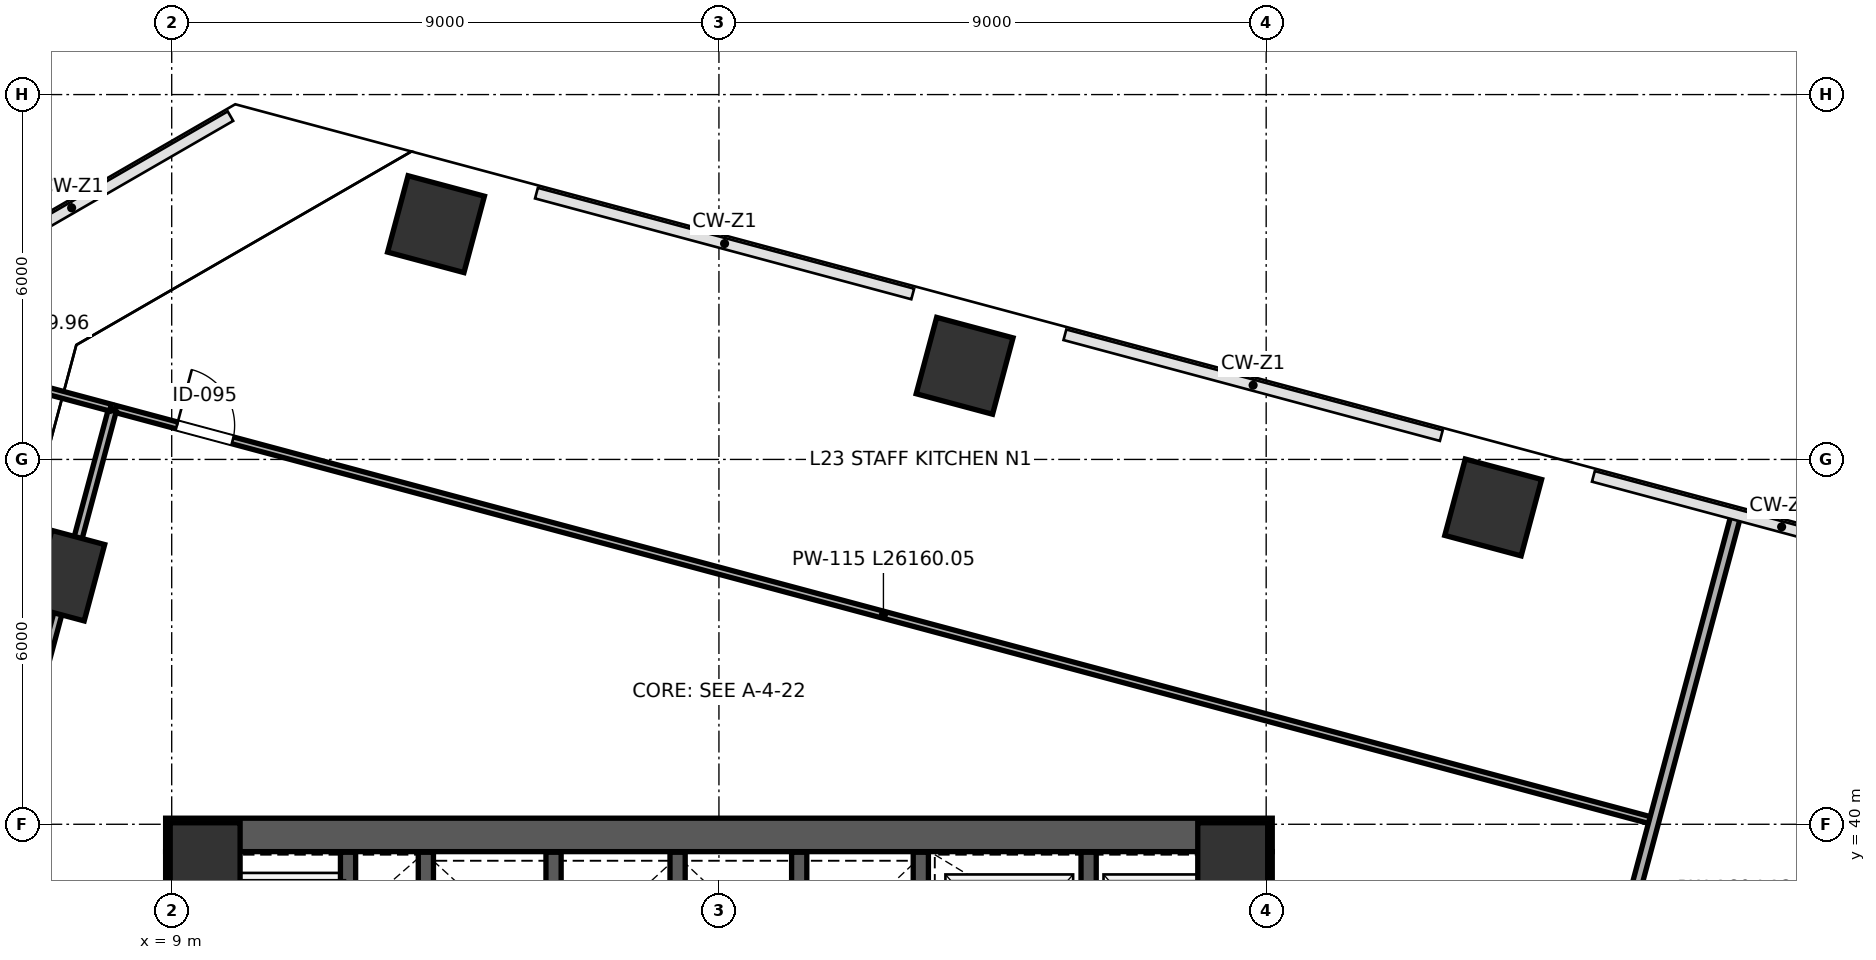
"""IFC4 building model, lengths in metres.
Left out: names, types, materials, properties, quantities, classifications, styles, units other than length and angle.
Written with IfcOpenShell. Run it as: python <this file> out.ifc"""

import sys

from ifc_helpers import new_model, si_unit, direction, frame, frame_2d, origin, origin_2d, place, context, subcontext, project, spatial, rectangle, extrude, clip, halfspace, source, transform, mapped, element, fill, save


model = new_model("IFC4")
c1 = context("Model", 3, precision=1e-05, world=origin(), true_north=direction((0.0, 1.0)))
c2 = subcontext(c1, "Body", "Model", "MODEL_VIEW")
j1 = project(units=[si_unit("LENGTHUNIT", "METRE"), si_unit("PLANEANGLEUNIT", "RADIAN")], contexts=[c1])
p1 = place(None, origin())
s1 = spatial("IfcSite", under=j1, at=p1, CompositionType="ELEMENT")
p2 = place(p1, origin())
s2 = spatial("IfcBuilding", under=s1, at=p2, CompositionType="ELEMENT")
p3 = place(p2, frame((0.0, 0.0, 104.2)))
s3 = spatial("IfcBuildingStorey", under=s2, at=p3, CompositionType="ELEMENT", Elevation=104.2)
m1 = source(origin(), c2, "Body", "SweptSolid", [
    extrude(rectangle(XDim=1.15, YDim=1.15, at=origin_2d()), origin(), (0.0, 0.0, 1.0), 4.198),
])
for number, where, z_axis, x_axis in (
    (1, (9.55, 39.45, 0.001), (0.0, 0.0, 1.0), (1.0, 0.0, 0.0)),
    (2, (26.45, 39.45, 0.001), (0.0, 0.0, 1.0), (1.0, 0.0, 0.0)),
):
    element("IfcColumn", number, at=place(p3, frame(where, z_axis=z_axis, x_axis=x_axis)), inside=s3, PredefinedType="COLUMN", context=c2, shape_type="MappedRepresentation", body=[
        mapped(m1, transform((0.0, 0.0, 0.0), scale=1.0)),
    ])
p4 = place(p3, frame((13.347, 49.869, 0.0), z_axis=(0.092815704431, 0.041116489627, 0.994833995846), x_axis=(0.155810351759, -0.987437496095, 0.026274047849)))
e3 = element("IfcColumn", 3, at=p4, inside=s3, PredefinedType="COLUMN", context=c2, shape_type="Clipping", body=[
    clip(clip(extrude(rectangle(XDim=1.3, YDim=1.3, at=origin_2d()), origin(), (0.0, 0.0, 1.0), 4.222), halfspace(frame((0.0, 0.0, 0.082), z_axis=(0.0, 0.0, -1.0), x_axis=(1.0, 0.0, 0.0)), False)), halfspace(frame((0.0, 0.0, 4.14), z_axis=(0.0, 0.0, 1.0), x_axis=(1.0, 0.0, 0.0)), False)),
])
p5 = place(p3, frame((22.04, 47.54, 0.0), z_axis=(0.080421722381, -0.003650265497, 0.996754243598), x_axis=(-0.301511014644, -0.953234999804, 0.020836103199)))
e4 = element("IfcColumn", 4, at=p5, inside=s3, PredefinedType="COLUMN", context=c2, shape_type="Clipping", body=[
    clip(clip(extrude(rectangle(XDim=1.3, YDim=1.3, at=origin_2d()), origin(), (0.0, 0.0, 1.0), 4.214), halfspace(frame((0.0, 0.0, 0.065), z_axis=(0.0, 0.0, -1.0), x_axis=(1.0, 0.0, 0.0)), False)), halfspace(frame((0.0, 0.0, 4.149), z_axis=(0.0, 0.0, 1.0), x_axis=(1.0, 0.0, 0.0)), False)),
])
p6 = place(p3, frame((30.734, 45.21, 0.0), z_axis=(0.067889968656, -0.048542486121, 0.996511203749), x_axis=(-0.771615774853, -0.635722031456, 0.021600803684)))
e5 = element("IfcColumn", 5, at=p6, inside=s3, PredefinedType="COLUMN", context=c2, shape_type="Clipping", body=[
    clip(clip(extrude(rectangle(XDim=1.3, YDim=1.3, at=origin_2d()), origin(), (0.0, 0.0, 1.0), 4.215), halfspace(frame((0.0, 0.0, 0.067), z_axis=(0.0, 0.0, -1.0), x_axis=(1.0, 0.0, 0.0)), False)), halfspace(frame((0.0, 0.0, 4.147), z_axis=(0.0, 0.0, 1.0), x_axis=(1.0, 0.0, 0.0)), False)),
])
p7 = place(p3, frame((7.295, 44.088, 0.0), z_axis=(0.063297021614, 0.072785789023, 0.995336986136), x_axis=(0.559820742609, -0.828237566944, 0.02496535295)))
e6 = element("IfcColumn", 6, at=p7, inside=s3, PredefinedType="PILASTER", context=c2, shape_type="Clipping", body=[
    clip(clip(extrude(rectangle(XDim=0.9, YDim=1.3, at=origin_2d()), origin(), (0.0, 0.0, 1.0), 4.22), halfspace(frame((0.0, 0.0, 0.073), z_axis=(0.0, 0.0, -1.0), x_axis=(1.0, 0.0, 0.0)), False)), halfspace(frame((0.0, 0.0, 4.147), z_axis=(0.0, 0.0, 1.0), x_axis=(1.0, 0.0, 0.0)), False)),
])
p8 = place(p3, frame((9.175, 24.45, 0.0), z_axis=(0.0, 0.0, 1.0), x_axis=(0.0, 1.0, 0.0)))
e7 = element("IfcWall", 7, at=p8, inside=s3, PredefinedType="SHEAR", context=c2, shape_type="SweptSolid", body=[
    extrude(rectangle(XDim=15.1, YDim=0.55, at=frame_2d((7.55, 0.0))), origin(), (0.0, 0.0, 1.0), 3.96),
])
p9 = place(p3, frame((26.825, 24.45, 0.0), z_axis=(0.0, 0.0, 1.0), x_axis=(0.0, 1.0, 0.0)))
e8 = element("IfcWall", 8, at=p9, inside=s3, PredefinedType="SHEAR", context=c2, shape_type="SweptSolid", body=[
    extrude(rectangle(XDim=15.1, YDim=0.55, at=frame_2d((7.55, 0.0))), origin(), (0.0, 0.0, 1.0), 3.96),
])
p10 = place(p9, frame((8.6, 0.0, 0.0)))
e9 = element("IfcOpeningElement", 9, at=p10, cuts=e8, PredefinedType="OPENING", context=c2, shape_type="SweptSolid", body=[
    extrude(rectangle(XDim=1.15, YDim=2.2, at=frame_2d((0.575, 1.1))), frame((0.0, 0.285, 0.0), z_axis=(0.0, -1.0, 0.0), x_axis=(1.0, 0.0, 0.0)), (0.0, 0.0, 1.0), 0.57),
])
p11 = place(p3, frame((8.9, 39.825, 0.0), z_axis=(0.0, 0.0, 1.0), x_axis=(1.0, 0.0, 0.0)))
e10 = element("IfcWall", 10, at=p11, inside=s3, PredefinedType="SHEAR", context=c2, shape_type="SweptSolid", body=[
    extrude(rectangle(XDim=18.2, YDim=0.55, at=frame_2d((9.1, 0.0))), origin(), (0.0, 0.0, 1.0), 3.96),
])
p12 = place(p3, frame((21.32, 32.12, 0.0), z_axis=(0.0, 0.0, 1.0), x_axis=(0.0, 1.0, 0.0)))
e11 = element("IfcWall", 11, at=p12, inside=s3, PredefinedType="SHEAR", context=c2, shape_type="SweptSolid", body=[
    extrude(rectangle(XDim=7.42, YDim=0.25, at=frame_2d((3.71, 0.0))), origin(), (0.0, 0.0, 1.0), 3.96),
])
p13 = place(p12, frame((1.4, 0.0, 0.0)))
e12 = element("IfcOpeningElement", 12, at=p13, cuts=e11, PredefinedType="OPENING", context=c2, shape_type="SweptSolid", body=[
    extrude(rectangle(XDim=1.15, YDim=2.2, at=frame_2d((0.575, 1.1))), frame((0.0, 0.135, 0.0), z_axis=(0.0, -1.0, 0.0), x_axis=(1.0, 0.0, 0.0)), (0.0, 0.0, 1.0), 0.27),
])
p14 = place(p3, frame((11.9, 36.31, 0.0), z_axis=(0.0, 0.0, 1.0), x_axis=(0.0, 1.0, 0.0)))
e13 = element("IfcWall", 13, at=p14, inside=s3, PredefinedType="SHEAR", context=c2, shape_type="SweptSolid", body=[
    extrude(rectangle(XDim=3.23, YDim=0.25, at=frame_2d((1.615, 0.0))), origin(), (0.0, 0.0, 1.0), 3.96),
])
p15 = place(p3, frame((24.08, 36.48, 0.0), z_axis=(0.0, 0.0, 1.0), x_axis=(0.0, 1.0, 0.0)))
e14 = element("IfcWall", 14, at=p15, inside=s3, PredefinedType="SHEAR", context=c2, shape_type="SweptSolid", body=[
    extrude(rectangle(XDim=3.06, YDim=0.25, at=frame_2d((1.53, 0.0))), origin(), (0.0, 0.0, 1.0), 3.96),
])
for number, where, z_axis, x_axis in (
    (15, (13.18, 35.81, 0.0), (0.0, 0.0, 1.0), (0.0, 1.0, 0.0)),
    (16, (15.28, 35.81, 0.0), (0.0, 0.0, 1.0), (0.0, 1.0, 0.0)),
    (17, (17.32, 35.81, 0.0), (0.0, 0.0, 1.0), (0.0, 1.0, 0.0)),
    (18, (19.32, 35.81, 0.0), (0.0, 0.0, 1.0), (0.0, 1.0, 0.0)),
):
    element("IfcWall", number, at=place(p3, frame(where, z_axis=z_axis, x_axis=x_axis)), inside=s3, PredefinedType="SHEAR", context=c2, shape_type="SweptSolid", body=[
        extrude(rectangle(XDim=3.73, YDim=0.25, at=frame_2d((1.865, 0.0))), origin(), (0.0, 0.0, 1.0), 3.96),
    ])
p16 = place(p3, frame((8.071, 46.831, 0.0), z_axis=(0.0, 0.0, 1.0), x_axis=(0.965925848141, -0.258818963551, 0.0)))
e19 = element("IfcWall", 19, at=p16, inside=s3, PredefinedType="PARTITIONING", context=c2, shape_type="SweptSolid", body=[
    extrude(rectangle(XDim=26.16, YDim=0.115, at=frame_2d((13.08, 0.0))), origin(), (0.0, 0.0, 1.0), 3.96),
])
p17 = place(p16, frame((1.05, 0.0, 0.0)))
e20 = element("IfcOpeningElement", 20, at=p17, cuts=e19, PredefinedType="OPENING", context=c2, shape_type="SweptSolid", body=[
    extrude(rectangle(XDim=0.95, YDim=2.15, at=frame_2d((0.475, 1.075))), frame((0.0, 0.067, 0.0), z_axis=(0.0, -1.0, 0.0), x_axis=(1.0, 0.0, 0.0)), (0.0, 0.0, 1.0), 0.135),
])
p18 = place(p3, frame((1.678, 23.128, 0.0), z_axis=(0.0, 0.0, 1.0), x_axis=(0.258813756198, 0.965927243431, 0.0)))
e21 = element("IfcWall", 21, at=p18, inside=s3, PredefinedType="PARTITIONING", context=c2, shape_type="SweptSolid", body=[
    extrude(rectangle(XDim=24.51, YDim=0.135, at=frame_2d((12.255, 0.0))), origin(), (0.0, 0.0, 1.0), 2.795),
])
p19 = place(p18, frame((2.6, 0.0, 0.0)))
e22 = element("IfcOpeningElement", 22, at=p19, cuts=e21, PredefinedType="OPENING", context=c2, shape_type="SweptSolid", body=[
    extrude(rectangle(XDim=0.95, YDim=2.15, at=frame_2d((0.475, 1.075))), frame((0.0, 0.078, 0.0), z_axis=(0.0, -1.0, 0.0), x_axis=(1.0, 0.0, 0.0)), (0.0, 0.0, 1.0), 0.155),
])
p20 = place(p3, frame((4.487, 47.791, 0.0), z_axis=(0.0, 0.0, 1.0), x_axis=(0.965930639999, -0.258801079426, 0.0)))
e23 = element("IfcWall", 23, at=p20, inside=s3, PredefinedType="PARTITIONING", context=c2, shape_type="SweptSolid", body=[
    extrude(rectangle(XDim=3.63, YDim=0.115, at=frame_2d((1.815, 0.0))), origin(), (0.0, 0.0, 1.0), 3.96),
])
p21 = place(p3, frame((31.445, 32.834, 0.0), z_axis=(0.0, 0.0, 1.0), x_axis=(0.258816538161, 0.965926498018, 0.0)))
e24 = element("IfcWall", 24, at=p21, inside=s3, PredefinedType="PARTITIONING", context=c2, shape_type="SweptSolid", body=[
    extrude(rectangle(XDim=12.64, YDim=0.16, at=frame_2d((6.32, 0.0))), origin(), (0.0, 0.0, 1.0), 3.095),
])
m2 = source(origin(), c2, "Body", "SweptSolid", [
    extrude(rectangle(XDim=0.95, YDim=2.15, at=frame_2d((0.475, 1.075))), frame((0.0, 0.025, 0.0), z_axis=(0.0, -1.0, 0.0), x_axis=(1.0, 0.0, 0.0)), (0.0, 0.0, 1.0), 0.05),
])
p22 = place(p17, origin())
e25 = element("IfcDoor", 25, at=p22, inside=s3, OperationType="SINGLE_SWING_LEFT", PredefinedType="DOOR", context=c2, shape_type="MappedRepresentation", body=[
    mapped(m2, transform((0.0, 0.0, 0.0), scale=1.0)),
])
fill(e20, e25)
save(model, sys.argv[1])
